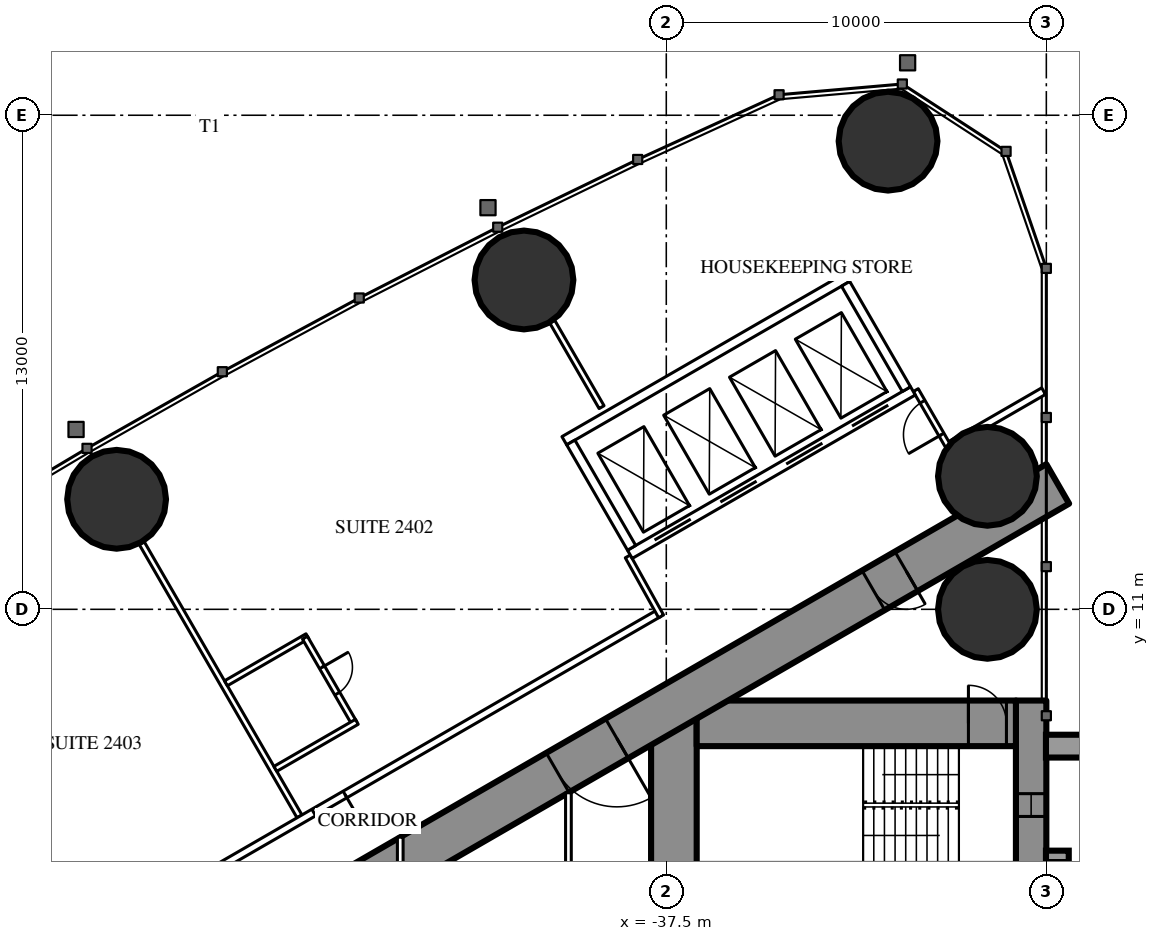
"""IFC4 building model, lengths in metres.
Left out: names, types, materials, properties, quantities, classifications, styles, units other than length and angle.
Written with IfcOpenShell. Run it as: python <this file> out.ifc"""

import sys

from ifc_helpers import new_model, si_unit, direction, frame, frame_2d, origin, origin_2d, place, context, subcontext, project, spatial, rectangle, hollow_circle, extrude, element, fill, save


model = new_model("IFC4")
c1 = context("Model", 3, precision=1e-05, world=origin(), true_north=direction((0.0, 1.0)))
c2 = subcontext(c1, "Body", "Model", "MODEL_VIEW")
j1 = project(units=[si_unit("LENGTHUNIT", "METRE"), si_unit("PLANEANGLEUNIT", "RADIAN")], contexts=[c1])
p1 = place(None, origin())
s1 = spatial("IfcSite", under=j1, at=p1, CompositionType="ELEMENT")
p2 = place(p1, origin())
s2 = spatial("IfcBuilding", under=s1, at=p2, CompositionType="ELEMENT")
p3 = place(p2, frame((0.0, 0.0, 94.1)))
s3 = spatial("IfcBuildingStorey", under=s2, at=p3, CompositionType="ELEMENT", Elevation=94.1)
for number, where, z_axis, x_axis in (
    (1, (-31.665, 23.318, 0.0), (0.0, 0.0, 1.0), (1.0, 0.0, 0.0)),
    (2, (-29.05, 11.0, 0.0), (0.0, 0.0, 1.0), (1.0, 0.0, 0.0)),
    (3, (-29.05, 14.5, 0.0), (0.0, 0.0, 1.0), (1.0, 0.0, 0.0)),
    (4, (-41.245, 19.666, 0.0), (0.0, 0.0, 1.0), (1.0, 0.0, 0.0)),
    (5, (-51.963, 13.895, 0.0), (0.0, 0.0, 1.0), (1.0, 0.0, 0.0)),
):
    element("IfcColumn", number, at=place(p3, frame(where, z_axis=z_axis, x_axis=x_axis)), inside=s3, PredefinedType="COLUMN", context=c2, shape_type="SweptSolid", body=[
        extrude(hollow_circle(Radius=1.3, WallThickness=0.1, at=origin_2d()), origin(), (0.0, 0.0, 1.0), 3.5),
    ])
p4 = place(p3, frame((-27.9, 8.6, 0.0), z_axis=(0.0, 0.0, 1.0), x_axis=(0.0, -1.0, 0.0)))
e6 = element("IfcWall", 6, at=p4, inside=s3, PredefinedType="SHEAR", context=c2, shape_type="SweptSolid", body=[
    extrude(rectangle(XDim=17.2, YDim=0.8, at=frame_2d((8.6, 0.0))), origin(), (0.0, 0.0, 1.0), 3.5),
])
p5 = place(p4, frame((2.45, 0.0, 0.6)))
e7 = element("IfcOpeningElement", 7, at=p5, cuts=e6, PredefinedType="OPENING", context=c2, shape_type="SweptSolid", body=[
    extrude(rectangle(XDim=0.6, YDim=2.1, at=frame_2d((0.3, 1.05))), frame((0.0, 0.41, 0.0), z_axis=(0.0, -1.0, 0.0), x_axis=(1.0, 0.0, 0.0)), (0.0, 0.0, 1.0), 0.82),
])
p6 = place(p4, frame((14.15, 0.0, 0.6)))
e8 = element("IfcOpeningElement", 8, at=p6, cuts=e6, PredefinedType="OPENING", context=c2, shape_type="SweptSolid", body=[
    extrude(rectangle(XDim=0.6, YDim=2.1, at=frame_2d((0.3, 1.05))), frame((0.0, 0.41, 0.0), z_axis=(0.0, -1.0, 0.0), x_axis=(1.0, 0.0, 0.0)), (0.0, 0.0, 1.0), 0.82),
])
p7 = place(p3, frame((-37.3, 8.6, 0.0), z_axis=(0.0, 0.0, 1.0), x_axis=(0.0, -1.0, 0.0)))
e9 = element("IfcWall", 9, at=p7, inside=s3, PredefinedType="SHEAR", context=c2, shape_type="SweptSolid", body=[
    extrude(rectangle(XDim=17.2, YDim=1.2, at=frame_2d((8.6, 0.0))), origin(), (0.0, 0.0, 1.0), 3.5),
])
p8 = place(p7, frame((7.7, 0.0, 0.0)))
e10 = element("IfcOpeningElement", 10, at=p8, cuts=e9, PredefinedType="OPENING", context=c2, shape_type="SweptSolid", body=[
    extrude(rectangle(XDim=1.8, YDim=2.2, at=frame_2d((0.9, 1.1))), frame((0.0, 0.61, 0.0), z_axis=(0.0, -1.0, 0.0), x_axis=(1.0, 0.0, 0.0)), (0.0, 0.0, 1.0), 1.22),
])
p9 = place(p3, frame((-28.3, 8.0, 0.0), z_axis=(0.0, 0.0, 1.0), x_axis=(-1.0, 0.0, 0.0)))
e11 = element("IfcWall", 11, at=p9, inside=s3, PredefinedType="SHEAR", context=c2, shape_type="SweptSolid", body=[
    extrude(rectangle(XDim=8.4, YDim=1.2, at=frame_2d((4.2, 0.0))), origin(), (0.0, 0.0, 1.0), 3.5),
])
p10 = place(p9, frame((0.25, 0.0, 0.0)))
e12 = element("IfcOpeningElement", 12, at=p10, cuts=e11, PredefinedType="OPENING", context=c2, shape_type="SweptSolid", body=[
    extrude(rectangle(XDim=1.0, YDim=2.2, at=frame_2d((0.5, 1.1))), frame((0.0, 0.61, 0.0), z_axis=(0.0, -1.0, 0.0), x_axis=(1.0, 0.0, 0.0)), (0.0, 0.0, 1.0), 1.22),
])
p11 = place(p3, frame((-27.2, 14.3, 0.0), z_axis=(0.0, 0.0, 1.0), x_axis=(-0.866026593062, -0.499997940104, 0.0)))
e13 = element("IfcWall", 13, at=p11, inside=s3, PredefinedType="SHEAR", context=c2, shape_type="SweptSolid", body=[
    extrude(rectangle(XDim=28.946, YDim=1.2, at=frame_2d((14.473, 0.0))), origin(), (0.0, 0.0, 1.0), 3.5),
])
p12 = place(p11, frame((4.6, 0.0, 0.0)))
e14 = element("IfcOpeningElement", 14, at=p12, cuts=e13, PredefinedType="OPENING", context=c2, shape_type="SweptSolid", body=[
    extrude(rectangle(XDim=1.0, YDim=2.2, at=frame_2d((0.5, 1.1))), frame((0.0, 0.61, 0.0), z_axis=(0.0, -1.0, 0.0), x_axis=(1.0, 0.0, 0.0)), (0.0, 0.0, 1.0), 1.22),
])
p13 = place(p11, frame((13.395, 0.0, 0.0)))
e15 = element("IfcOpeningElement", 15, at=p13, cuts=e13, PredefinedType="OPENING", context=c2, shape_type="SweptSolid", body=[
    extrude(rectangle(XDim=1.8, YDim=2.2, at=frame_2d((0.9, 1.1))), frame((0.0, 0.61, 0.0), z_axis=(0.0, -1.0, 0.0), x_axis=(1.0, 0.0, 0.0)), (0.0, 0.0, 1.0), 1.22),
])
p14 = place(p3, frame((-47.151, 5.552, 0.0), z_axis=(0.0, 0.0, 1.0), x_axis=(-0.500003012045, 0.866023664773, 0.0)))
e16 = element("IfcWall", 16, at=p14, inside=s3, PredefinedType="PARTITIONING", context=c2, shape_type="SweptSolid", body=[
    extrude(rectangle(XDim=8.311, YDim=0.15, at=frame_2d((4.156, 0.0))), origin(), (0.0, 0.0, 1.0), 2.2),
])
p15 = place(p3, frame((-39.202, 16.32, 0.0), z_axis=(0.0, 0.0, 1.0), x_axis=(-0.499947391036, 0.866055775454, 0.0)))
e17 = element("IfcWall", 17, at=p15, inside=s3, PredefinedType="PARTITIONING", context=c2, shape_type="SweptSolid", body=[
    extrude(rectangle(XDim=2.599, YDim=0.15, at=frame_2d((1.3, 0.0))), origin(), (0.0, 0.0, 1.0), 3.25),
])
p16 = place(p3, frame((-27.572, 16.741, 0.0), z_axis=(0.0, 0.0, 1.0), x_axis=(-0.866034618596, -0.499984039138, 0.0)))
e18 = element("IfcWall", 18, at=p16, inside=s3, PredefinedType="PARTITIONING", context=c2, shape_type="SweptSolid", body=[
    extrude(rectangle(XDim=2.854, YDim=0.2, at=frame_2d((1.427, 0.0))), origin(), (0.0, 0.0, 1.0), 3.25),
])
p17 = place(p3, frame((-37.7, 10.894, 0.0), z_axis=(0.0, 0.0, 1.0), x_axis=(-0.866027905338, -0.499995667157, 0.0)))
e19 = element("IfcWall", 19, at=p17, inside=s3, PredefinedType="PARTITIONING", context=c2, shape_type="SweptSolid", body=[
    extrude(rectangle(XDim=21.787, YDim=0.2, at=frame_2d((10.894, 0.0))), origin(), (0.0, 0.0, 1.0), 3.25),
])
p18 = place(p17, frame((17.887, 0.0, 0.0)))
e20 = element("IfcOpeningElement", 20, at=p18, cuts=e19, PredefinedType="OPENING", context=c2, shape_type="SweptSolid", body=[
    extrude(rectangle(XDim=0.95, YDim=2.2, at=frame_2d((0.475, 1.1))), frame((0.0, 0.11, 0.0), z_axis=(0.0, -1.0, 0.0), x_axis=(1.0, 0.0, 0.0)), (0.0, 0.0, 1.0), 0.22),
])
p19 = place(p17, frame((9.531, 0.0, 0.0)))
e21 = element("IfcOpeningElement", 21, at=p19, cuts=e19, PredefinedType="OPENING", context=c2, shape_type="SweptSolid", body=[
    extrude(rectangle(XDim=0.95, YDim=2.2, at=frame_2d((0.475, 1.1))), frame((0.0, 0.11, 0.0), z_axis=(0.0, -1.0, 0.0), x_axis=(1.0, 0.0, 0.0)), (0.0, 0.0, 1.0), 0.22),
])
p20 = place(p3, frame((-38.513, 12.392, 0.0), z_axis=(0.0, 0.0, 1.0), x_axis=(0.485585508183, -0.874189175317, 0.0)))
e22 = element("IfcWall", 22, at=p20, inside=s3, PredefinedType="PARTITIONING", context=c2, shape_type="SweptSolid", body=[
    extrude(rectangle(XDim=1.805, YDim=0.15, at=frame_2d((0.902, 0.0))), origin(), (0.0, 0.0, 1.0), 3.25),
])
p21 = place(p3, frame((-30.033, 15.205, 0.0), z_axis=(0.0, 0.0, 1.0), x_axis=(-0.499980071345, 0.866036909293, 0.0)))
e23 = element("IfcWall", 23, at=p21, inside=s3, PredefinedType="PARTITIONING", context=c2, shape_type="SweptSolid", body=[
    extrude(rectangle(XDim=1.805, YDim=0.15, at=frame_2d((0.902, 0.0))), origin(), (0.0, 0.0, 1.0), 2.2),
])
p22 = place(p21, frame((0.452, 0.0, 0.0)))
e24 = element("IfcOpeningElement", 24, at=p22, cuts=e23, PredefinedType="OPENING", context=c2, shape_type="SweptSolid", body=[
    extrude(rectangle(XDim=1.0, YDim=2.2, at=frame_2d((0.5, 1.1))), frame((0.0, 0.085, 0.0), z_axis=(0.0, -1.0, 0.0), x_axis=(1.0, 0.0, 0.0)), (0.0, 0.0, 1.0), 0.17),
])
p23 = place(p3, frame((-46.943, 10.292, 0.0), z_axis=(0.0, 0.0, 1.0), x_axis=(-0.866006523861, -0.500032699561, 0.0)))
e25 = element("IfcWall", 25, at=p23, inside=s3, PredefinedType="PARTITIONING", context=c2, shape_type="SweptSolid", body=[
    extrude(rectangle(XDim=2.475, YDim=0.15, at=frame_2d((1.237, 0.0))), origin(), (0.0, 0.0, 1.0), 3.25),
])
p24 = place(p3, frame((-45.708, 8.002, 0.0), z_axis=(0.0, 0.0, 1.0), x_axis=(-0.500047596559, 0.865997922154, 0.0)))
e26 = element("IfcWall", 26, at=p24, inside=s3, PredefinedType="PARTITIONING", context=c2, shape_type="SweptSolid", body=[
    extrude(rectangle(XDim=2.6, YDim=0.15, at=frame_2d((1.3, 0.0))), origin(), (0.0, 0.0, 1.0), 3.25),
])
p25 = place(p24, frame((0.9, 0.0, 0.0)))
e27 = element("IfcOpeningElement", 27, at=p25, cuts=e26, PredefinedType="OPENING", context=c2, shape_type="SweptSolid", body=[
    extrude(rectangle(XDim=0.8, YDim=2.2, at=frame_2d((0.4, 1.1))), frame((0.0, 0.085, 0.0), z_axis=(0.0, -1.0, 0.0), x_axis=(1.0, 0.0, 0.0)), (0.0, 0.0, 1.0), 0.17),
])
p26 = place(p3, frame((-45.643, 8.04, 0.0), z_axis=(0.0, 0.0, 1.0), x_axis=(-0.866006523861, -0.500032699561, 0.0)))
e28 = element("IfcWall", 28, at=p26, inside=s3, PredefinedType="PARTITIONING", context=c2, shape_type="SweptSolid", body=[
    extrude(rectangle(XDim=2.475, YDim=0.15, at=frame_2d((1.237, 0.0))), origin(), (0.0, 0.0, 1.0), 3.25),
])
p27 = place(p3, frame((-40.075, 6.174, 0.0), z_axis=(0.0, 0.0, 1.0), x_axis=(0.0, -1.0, 0.0)))
e29 = element("IfcWall", 29, at=p27, inside=s3, PredefinedType="PARTITIONING", context=c2, shape_type="SweptSolid", body=[
    extrude(rectangle(XDim=7.374, YDim=0.15, at=frame_2d((3.687, 0.0))), origin(), (0.0, 0.0, 1.0), 3.25),
])
p28 = place(p27, frame((2.787, 0.0, 0.0)))
e30 = element("IfcOpeningElement", 30, at=p28, cuts=e29, PredefinedType="OPENING", context=c2, shape_type="SweptSolid", body=[
    extrude(rectangle(XDim=1.8, YDim=2.2, at=frame_2d((0.9, 1.1))), frame((0.0, 0.085, 0.0), z_axis=(0.0, -1.0, 0.0), x_axis=(1.0, 0.0, 0.0)), (0.0, 0.0, 1.0), 0.17),
])
p29 = place(p3, frame((-44.5, 5.005, 0.0), z_axis=(0.0, 0.0, 1.0), x_axis=(0.0, -1.0, 0.0)))
e31 = element("IfcWall", 31, at=p29, inside=s3, PredefinedType="PARTITIONING", context=c2, shape_type="SweptSolid", body=[
    extrude(rectangle(XDim=10.009, YDim=0.15, at=frame_2d((5.005, 0.0))), origin(), (0.0, 0.0, 1.0), 2.45),
])
p30 = place(p29, frame((2.002, 0.0, 0.0)))
e32 = element("IfcOpeningElement", 32, at=p30, cuts=e31, PredefinedType="OPENING", context=c2, shape_type="SweptSolid", body=[
    extrude(rectangle(XDim=1.0, YDim=2.2, at=frame_2d((0.5, 1.1))), frame((0.0, 0.085, 0.0), z_axis=(0.0, -1.0, 0.0), x_axis=(1.0, 0.0, 0.0)), (0.0, 0.0, 1.0), 0.17),
])
p31 = place(p29, frame((7.007, 0.0, 0.0)))
e33 = element("IfcOpeningElement", 33, at=p31, cuts=e31, PredefinedType="OPENING", context=c2, shape_type="SweptSolid", body=[
    extrude(rectangle(XDim=1.0, YDim=2.2, at=frame_2d((0.5, 1.1))), frame((0.0, 0.085, 0.0), z_axis=(0.0, -1.0, 0.0), x_axis=(1.0, 0.0, 0.0)), (0.0, 0.0, 1.0), 0.17),
])
p32 = place(p3, frame((-31.01, 16.747, 0.0), z_axis=(0.0, 0.0, 1.0), x_axis=(-0.866028165386, -0.499995216735, 0.0)))
e34 = element("IfcWall", 34, at=p32, inside=s3, PredefinedType="PARTITIONING", context=c2, shape_type="SweptSolid", body=[
    extrude(rectangle(XDim=8.6, YDim=0.25, at=frame_2d((4.3, 0.0))), origin(), (0.0, 0.0, 1.0), 3.25),
])
p33 = place(p32, frame((0.75, 0.0, 0.0)))
e35 = element("IfcOpeningElement", 35, at=p33, cuts=e34, PredefinedType="OPENING", context=c2, shape_type="SweptSolid", body=[
    extrude(rectangle(XDim=1.1, YDim=2.2, at=frame_2d((0.55, 1.1))), frame((0.0, 0.135, 0.0), z_axis=(0.0, -1.0, 0.0), x_axis=(1.0, 0.0, 0.0)), (0.0, 0.0, 1.0), 0.27),
])
p34 = place(p32, frame((2.75, 0.0, 0.0)))
e36 = element("IfcOpeningElement", 36, at=p34, cuts=e34, PredefinedType="OPENING", context=c2, shape_type="SweptSolid", body=[
    extrude(rectangle(XDim=1.1, YDim=2.2, at=frame_2d((0.55, 1.1))), frame((0.0, 0.135, 0.0), z_axis=(0.0, -1.0, 0.0), x_axis=(1.0, 0.0, 0.0)), (0.0, 0.0, 1.0), 0.27),
])
p35 = place(p32, frame((4.75, 0.0, 0.0)))
e37 = element("IfcOpeningElement", 37, at=p35, cuts=e34, PredefinedType="OPENING", context=c2, shape_type="SweptSolid", body=[
    extrude(rectangle(XDim=1.1, YDim=2.2, at=frame_2d((0.55, 1.1))), frame((0.0, 0.135, 0.0), z_axis=(0.0, -1.0, 0.0), x_axis=(1.0, 0.0, 0.0)), (0.0, 0.0, 1.0), 0.27),
])
p36 = place(p32, frame((6.75, 0.0, 0.0)))
e38 = element("IfcOpeningElement", 38, at=p36, cuts=e34, PredefinedType="OPENING", context=c2, shape_type="SweptSolid", body=[
    extrude(rectangle(XDim=1.1, YDim=2.2, at=frame_2d((0.55, 1.1))), frame((0.0, 0.135, 0.0), z_axis=(0.0, -1.0, 0.0), x_axis=(1.0, 0.0, 0.0)), (0.0, 0.0, 1.0), 0.27),
])
p37 = place(p3, frame((-32.736, 19.736, 0.0), z_axis=(0.0, 0.0, 1.0), x_axis=(-0.866028165386, -0.499995216735, 0.0)))
e39 = element("IfcWall", 39, at=p37, inside=s3, PredefinedType="PARTITIONING", context=c2, shape_type="SweptSolid", body=[
    extrude(rectangle(XDim=8.6, YDim=0.25, at=frame_2d((4.3, 0.0))), origin(), (0.0, 0.0, 1.0), 3.25),
])
p38 = place(p3, frame((-31.181, 16.793, 0.0), z_axis=(0.0, 0.0, 1.0), x_axis=(-0.499929347863, 0.866066190972, 0.0)))
e40 = element("IfcWall", 40, at=p38, inside=s3, PredefinedType="PARTITIONING", context=c2, shape_type="SweptSolid", body=[
    extrude(rectangle(XDim=3.201, YDim=0.25, at=frame_2d((1.6, 0.0))), origin(), (0.0, 0.0, 1.0), 3.25),
])
p39 = place(p3, frame((-38.413, 12.618, 0.0), z_axis=(0.0, 0.0, 1.0), x_axis=(-0.499872130319, 0.866099216793, 0.0)))
e41 = element("IfcWall", 41, at=p39, inside=s3, PredefinedType="PARTITIONING", context=c2, shape_type="SweptSolid", body=[
    extrude(rectangle(XDim=3.2, YDim=0.25, at=frame_2d((1.6, 0.0))), origin(), (0.0, 0.0, 1.0), 3.25),
])
p40 = place(p25, origin())
e42 = element("IfcDoor", 42, at=p40, inside=s3, OperationType="SINGLE_SWING_RIGHT", PredefinedType="DOOR", context=c2, shape_type="SweptSolid", body=[
    extrude(rectangle(XDim=0.8, YDim=2.2, at=frame_2d((0.4, 1.1))), frame((0.0, 0.025, 0.0), z_axis=(0.0, -1.0, 0.0), x_axis=(1.0, 0.0, 0.0)), (0.0, 0.0, 1.0), 0.05),
])
fill(e27, e42)
p41 = place(p19, origin())
e43 = element("IfcDoor", 43, at=p41, inside=s3, OperationType="SINGLE_SWING_LEFT", PredefinedType="DOOR", context=c2, shape_type="SweptSolid", body=[
    extrude(rectangle(XDim=0.95, YDim=2.2, at=frame_2d((0.475, 1.1))), frame((0.0, 0.025, 0.0), z_axis=(0.0, -1.0, 0.0), x_axis=(1.0, 0.0, 0.0)), (0.0, 0.0, 1.0), 0.05),
])
fill(e21, e43)
p42 = place(p22, origin())
e44 = element("IfcDoor", 44, at=p42, inside=s3, OperationType="SINGLE_SWING_LEFT", PredefinedType="DOOR", context=c2, shape_type="SweptSolid", body=[
    extrude(rectangle(XDim=1.0, YDim=2.2, at=frame_2d((0.5, 1.1))), frame((0.0, 0.025, 0.0), z_axis=(0.0, -1.0, 0.0), x_axis=(1.0, 0.0, 0.0)), (0.0, 0.0, 1.0), 0.05),
])
fill(e24, e44)
p43 = place(p12, origin())
e45 = element("IfcDoor", 45, at=p43, inside=s3, OperationType="SINGLE_SWING_LEFT", PredefinedType="DOOR", context=c2, shape_type="SweptSolid", body=[
    extrude(rectangle(XDim=1.0, YDim=2.2, at=frame_2d((0.5, 1.1))), frame((0.0, 0.025, 0.0), z_axis=(0.0, -1.0, 0.0), x_axis=(1.0, 0.0, 0.0)), (0.0, 0.0, 1.0), 0.05),
])
fill(e14, e45)
p44 = place(p13, origin())
e46 = element("IfcDoor", 46, at=p44, inside=s3, OperationType="DOUBLE_DOOR_SINGLE_SWING", PredefinedType="DOOR", context=c2, shape_type="SweptSolid", body=[
    extrude(rectangle(XDim=1.8, YDim=2.2, at=frame_2d((0.9, 1.1))), frame((0.0, 0.025, 0.0), z_axis=(0.0, -1.0, 0.0), x_axis=(1.0, 0.0, 0.0)), (0.0, 0.0, 1.0), 0.05),
])
fill(e15, e46)
p45 = place(p10, origin())
e47 = element("IfcDoor", 47, at=p45, inside=s3, OperationType="SINGLE_SWING_RIGHT", PredefinedType="DOOR", context=c2, shape_type="SweptSolid", body=[
    extrude(rectangle(XDim=1.0, YDim=2.2, at=frame_2d((0.5, 1.1))), frame((0.0, 0.025, 0.0), z_axis=(0.0, -1.0, 0.0), x_axis=(1.0, 0.0, 0.0)), (0.0, 0.0, 1.0), 0.05),
])
fill(e12, e47)
p46 = place(p33, origin())
e48 = element("IfcDoor", 48, at=p46, inside=s3, OperationType="DOUBLE_DOOR_SLIDING", PredefinedType="USERDEFINED", context=c2, shape_type="SweptSolid", body=[
    extrude(rectangle(XDim=1.1, YDim=2.2, at=frame_2d((0.55, 1.1))), frame((0.0, 0.025, 0.0), z_axis=(0.0, -1.0, 0.0), x_axis=(1.0, 0.0, 0.0)), (0.0, 0.0, 1.0), 0.05),
])
fill(e35, e48)
p47 = place(p34, origin())
e49 = element("IfcDoor", 49, at=p47, inside=s3, OperationType="DOUBLE_DOOR_SLIDING", PredefinedType="USERDEFINED", context=c2, shape_type="SweptSolid", body=[
    extrude(rectangle(XDim=1.1, YDim=2.2, at=frame_2d((0.55, 1.1))), frame((0.0, 0.025, 0.0), z_axis=(0.0, -1.0, 0.0), x_axis=(1.0, 0.0, 0.0)), (0.0, 0.0, 1.0), 0.05),
])
fill(e36, e49)
p48 = place(p35, origin())
e50 = element("IfcDoor", 50, at=p48, inside=s3, OperationType="DOUBLE_DOOR_SLIDING", PredefinedType="USERDEFINED", context=c2, shape_type="SweptSolid", body=[
    extrude(rectangle(XDim=1.1, YDim=2.2, at=frame_2d((0.55, 1.1))), frame((0.0, 0.025, 0.0), z_axis=(0.0, -1.0, 0.0), x_axis=(1.0, 0.0, 0.0)), (0.0, 0.0, 1.0), 0.05),
])
fill(e37, e50)
p49 = place(p36, origin())
e51 = element("IfcDoor", 51, at=p49, inside=s3, OperationType="DOUBLE_DOOR_SLIDING", PredefinedType="USERDEFINED", context=c2, shape_type="SweptSolid", body=[
    extrude(rectangle(XDim=1.1, YDim=2.2, at=frame_2d((0.55, 1.1))), frame((0.0, 0.025, 0.0), z_axis=(0.0, -1.0, 0.0), x_axis=(1.0, 0.0, 0.0)), (0.0, 0.0, 1.0), 0.05),
])
fill(e38, e51)
p50 = place(p5, origin())
e52 = element("IfcWindow", 52, at=p50, inside=s3, PartitioningType="SINGLE_PANEL", PredefinedType="WINDOW", context=c2, shape_type="SweptSolid", body=[
    extrude(rectangle(XDim=0.6, YDim=2.1, at=frame_2d((0.3, 1.05))), frame((0.0, 0.03, 0.0), z_axis=(0.0, -1.0, 0.0), x_axis=(1.0, 0.0, 0.0)), (0.0, 0.0, 1.0), 0.06),
])
fill(e7, e52)
save(model, sys.argv[1])
